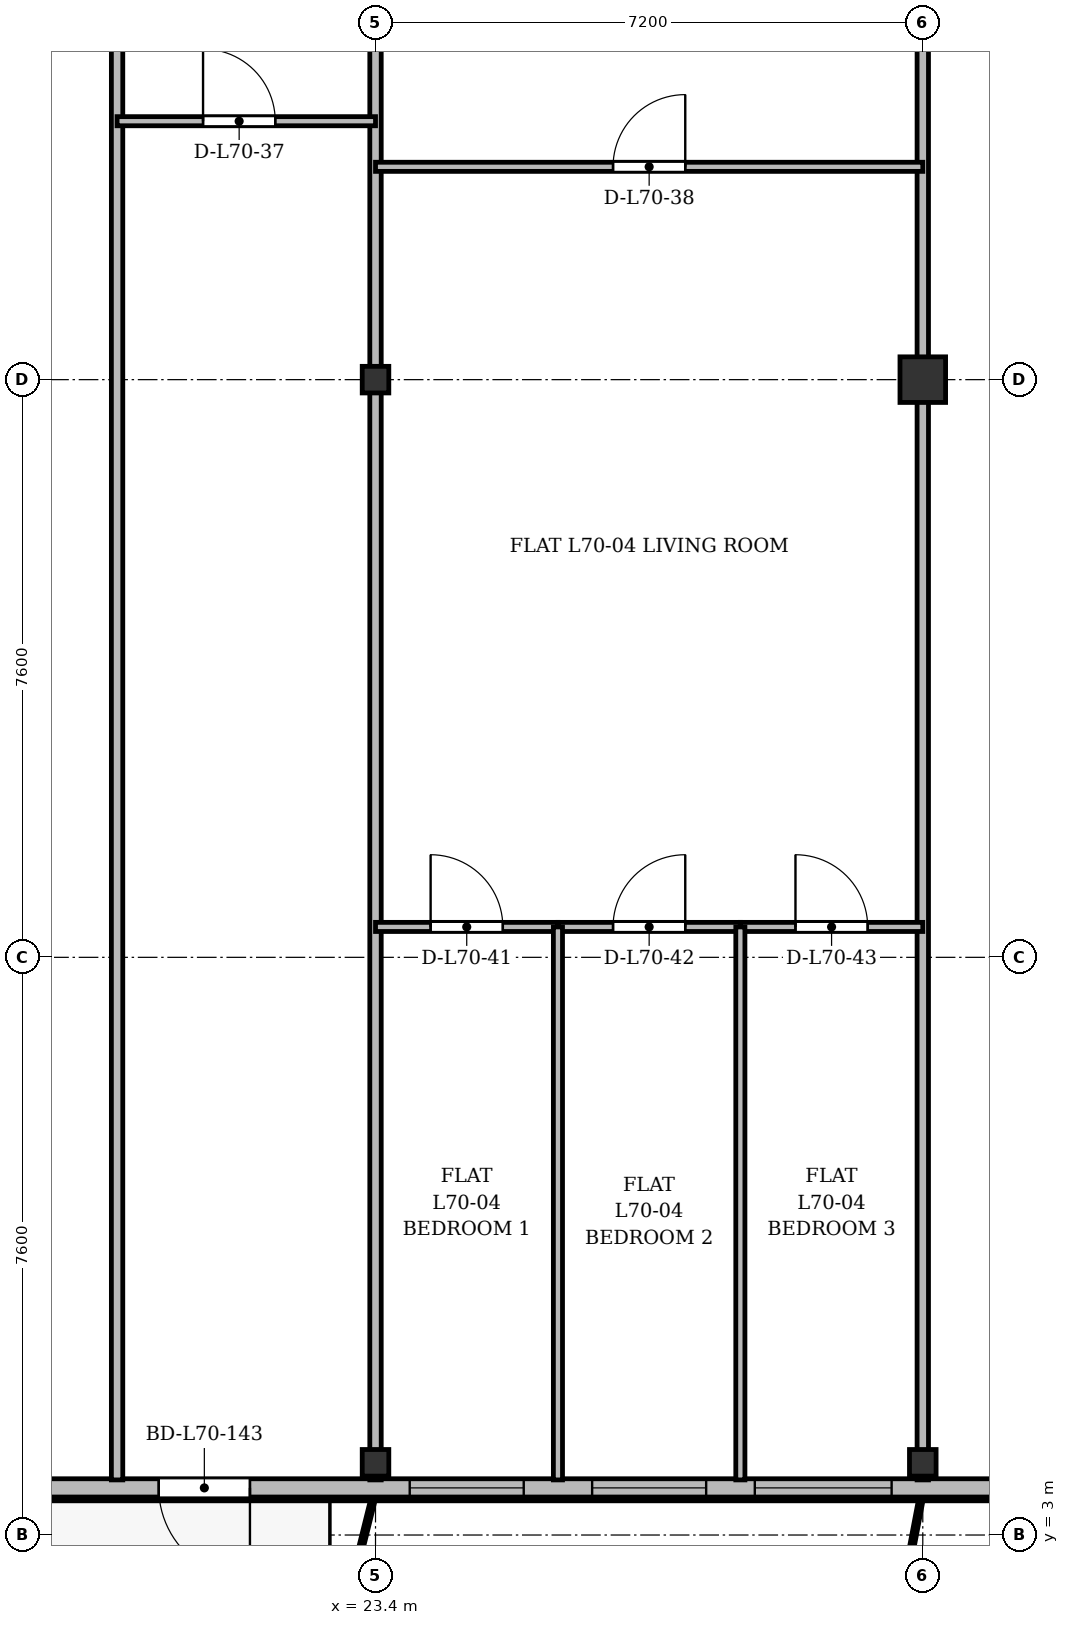
"""IFC4 building model, lengths in metres.
Left out: names, types, materials, properties, quantities, classifications, styles, units other than length and angle.
Written with IfcOpenShell. Run it as: python <this file> out.ifc"""

import sys

from ifc_helpers import new_model, si_unit, direction, frame, frame_2d, origin, origin_2d, place, context, subcontext, project, spatial, rectangle, i_section, extrude, source, transform, mapped, element, fill, save


model = new_model("IFC4")
c1 = context("Model", 3, precision=1e-05, world=origin(), true_north=direction((0.0, 1.0)))
c2 = subcontext(c1, "Body", "Model", "MODEL_VIEW")
j1 = project(units=[si_unit("LENGTHUNIT", "METRE"), si_unit("PLANEANGLEUNIT", "RADIAN")], contexts=[c1])
p1 = place(None, origin())
s1 = spatial("IfcSite", under=j1, at=p1, CompositionType="ELEMENT")
p2 = place(p1, origin())
s2 = spatial("IfcBuilding", under=s1, at=p2, CompositionType="ELEMENT")
p3 = place(p2, frame((0.0, 0.0, 270.3)))
s3 = spatial("IfcBuildingStorey", under=s2, at=p3, CompositionType="ELEMENT", Elevation=270.3)
m1 = source(origin(), c2, "Body", "SweptSolid", [
    extrude(i_section(OverallWidth=0.35, OverallDepth=0.35, WebThickness=0.018, FlangeThickness=0.028, at=origin_2d()), origin(), (0.0, 0.0, 1.0), 3.6),
])
for number, where, z_axis, x_axis in (
    (1, (23.4, 3.95, 0.0), (0.0, 0.0, 1.0), (1.0, 0.0, 0.0)),
    (2, (23.4, 18.2, 0.0), (0.0, 0.0, 1.0), (1.0, 0.0, 0.0)),
    (3, (30.6, 3.95, 0.0), (0.0, 0.0, 1.0), (1.0, 0.0, 0.0)),
):
    element("IfcColumn", number, at=place(p3, frame(where, z_axis=z_axis, x_axis=x_axis)), inside=s3, PredefinedType="COLUMN", context=c2, shape_type="MappedRepresentation", body=[
        mapped(m1, transform((0.0, 0.0, 0.0), x_axis=(1.0, 0.0, 0.0), y_axis=(0.0, 1.0, 0.0), z_axis=(0.0, 0.0, 1.0), scale=1.0)),
    ])
m2 = source(origin(), c2, "Body", "SweptSolid", [
    extrude(rectangle(XDim=0.6, YDim=0.6, at=origin_2d()), origin(), (0.0, 0.0, 1.0), 3.6),
])
p4 = place(p3, frame((30.6, 18.2, 0.0), z_axis=(0.0, 0.0, 1.0), x_axis=(1.0, 0.0, 0.0)))
e4 = element("IfcColumn", 4, at=p4, inside=s3, PredefinedType="COLUMN", context=c2, shape_type="MappedRepresentation", body=[
    mapped(m2, transform((0.0, 0.0, 0.0), x_axis=(1.0, 0.0, 0.0), y_axis=(0.0, 1.0, 0.0), z_axis=(0.0, 0.0, 1.0), scale=1.0)),
])
p5 = place(p3, frame((63.2, 3.62, 0.0), z_axis=(0.0, 0.0, 1.0), x_axis=(-1.0, 0.0, 0.0)))
e5 = element("IfcWall", 5, at=p5, inside=s3, PredefinedType="SOLIDWALL", context=c2, shape_type="SweptSolid", body=[
    extrude(rectangle(XDim=52.0, YDim=0.24, at=frame_2d((26.0, 0.0))), origin(), (0.0, 0.0, 1.0), 3.37),
])
p6 = place(p5, frame((1.345, 0.0, 0.9)))
e6 = element("IfcOpeningElement", 6, at=p6, cuts=e5, PredefinedType="OPENING", context=c2, shape_type="SweptSolid", body=[
    extrude(rectangle(XDim=1.8, YDim=1.8, at=frame_2d((0.9, 0.9))), frame((0.0, 0.13, 0.0), z_axis=(0.0, -1.0, 0.0), x_axis=(1.0, 0.0, 0.0)), (0.0, 0.0, 1.0), 0.26),
])
p7 = place(p5, frame((5.1, 0.0, 0.9)))
e7 = element("IfcOpeningElement", 7, at=p7, cuts=e5, PredefinedType="OPENING", context=c2, shape_type="SweptSolid", body=[
    extrude(rectangle(XDim=2.2, YDim=1.8, at=frame_2d((1.1, 0.9))), frame((0.0, 0.13, 0.0), z_axis=(0.0, -1.0, 0.0), x_axis=(1.0, 0.0, 0.0)), (0.0, 0.0, 1.0), 0.26),
])
p8 = place(p5, frame((9.35, 0.0, 0.9)))
e8 = element("IfcOpeningElement", 8, at=p8, cuts=e5, PredefinedType="OPENING", context=c2, shape_type="SweptSolid", body=[
    extrude(rectangle(XDim=1.5, YDim=1.75, at=frame_2d((0.75, 0.875))), frame((0.0, 0.13, 0.0), z_axis=(0.0, -1.0, 0.0), x_axis=(1.0, 0.0, 0.0)), (0.0, 0.0, 1.0), 0.26),
])
p9 = place(p5, frame((14.017, 0.0, 0.0)))
e9 = element("IfcOpeningElement", 9, at=p9, cuts=e5, PredefinedType="OPENING", context=c2, shape_type="SweptSolid", body=[
    extrude(rectangle(XDim=1.2, YDim=2.2, at=frame_2d((0.6, 1.1))), frame((0.0, 0.13, 0.0), z_axis=(0.0, -1.0, 0.0), x_axis=(1.0, 0.0, 0.0)), (0.0, 0.0, 1.0), 0.26),
])
p10 = place(p5, frame((25.175, 0.0, 0.9)))
e10 = element("IfcOpeningElement", 10, at=p10, cuts=e5, PredefinedType="OPENING", context=c2, shape_type="SweptSolid", body=[
    extrude(rectangle(XDim=1.65, YDim=1.85, at=frame_2d((0.825, 0.925))), frame((0.0, 0.13, 0.0), z_axis=(0.0, -1.0, 0.0), x_axis=(1.0, 0.0, 0.0)), (0.0, 0.0, 1.0), 0.26),
])
p11 = place(p5, frame((33.01, 0.0, 0.9)))
e11 = element("IfcOpeningElement", 11, at=p11, cuts=e5, PredefinedType="OPENING", context=c2, shape_type="SweptSolid", body=[
    extrude(rectangle(XDim=1.8, YDim=1.8, at=frame_2d((0.9, 0.9))), frame((0.0, 0.13, 0.0), z_axis=(0.0, -1.0, 0.0), x_axis=(1.0, 0.0, 0.0)), (0.0, 0.0, 1.0), 0.26),
])
p12 = place(p5, frame((35.45, 0.0, 0.9)))
e12 = element("IfcOpeningElement", 12, at=p12, cuts=e5, PredefinedType="OPENING", context=c2, shape_type="SweptSolid", body=[
    extrude(rectangle(XDim=1.5, YDim=1.75, at=frame_2d((0.75, 0.875))), frame((0.0, 0.13, 0.0), z_axis=(0.0, -1.0, 0.0), x_axis=(1.0, 0.0, 0.0)), (0.0, 0.0, 1.0), 0.26),
])
p13 = place(p5, frame((37.85, 0.0, 0.9)))
e13 = element("IfcOpeningElement", 13, at=p13, cuts=e5, PredefinedType="OPENING", context=c2, shape_type="SweptSolid", body=[
    extrude(rectangle(XDim=1.5, YDim=1.75, at=frame_2d((0.75, 0.875))), frame((0.0, 0.13, 0.0), z_axis=(0.0, -1.0, 0.0), x_axis=(1.0, 0.0, 0.0)), (0.0, 0.0, 1.0), 0.26),
])
p14 = place(p5, frame((41.452, 0.0, 0.0)))
e14 = element("IfcOpeningElement", 14, at=p14, cuts=e5, PredefinedType="OPENING", context=c2, shape_type="SweptSolid", body=[
    extrude(rectangle(XDim=1.2, YDim=2.2, at=frame_2d((0.6, 1.1))), frame((0.0, 0.13, 0.0), z_axis=(0.0, -1.0, 0.0), x_axis=(1.0, 0.0, 0.0)), (0.0, 0.0, 1.0), 0.26),
])
p15 = place(p5, frame((44.575, 0.0, 0.9)))
e15 = element("IfcOpeningElement", 15, at=p15, cuts=e5, PredefinedType="OPENING", context=c2, shape_type="SweptSolid", body=[
    extrude(rectangle(XDim=1.65, YDim=1.85, at=frame_2d((0.825, 0.925))), frame((0.0, 0.13, 0.0), z_axis=(0.0, -1.0, 0.0), x_axis=(1.0, 0.0, 0.0)), (0.0, 0.0, 1.0), 0.26),
])
p16 = place(p5, frame((48.855, 0.0, 0.9)))
e16 = element("IfcOpeningElement", 16, at=p16, cuts=e5, PredefinedType="OPENING", context=c2, shape_type="SweptSolid", body=[
    extrude(rectangle(XDim=1.8, YDim=1.8, at=frame_2d((0.9, 0.9))), frame((0.0, 0.13, 0.0), z_axis=(0.0, -1.0, 0.0), x_axis=(1.0, 0.0, 0.0)), (0.0, 0.0, 1.0), 0.26),
])
p17 = place(p3, frame((20.0, 3.725, 0.0), z_axis=(0.0, 0.0, 1.0), x_axis=(0.0, 1.0, 0.0)))
e17 = element("IfcWall", 17, at=p17, inside=s3, PredefinedType="PARTITIONING", context=c2, shape_type="SweptSolid", body=[
    extrude(rectangle(XDim=27.275, YDim=0.15, at=frame_2d((13.637, 0.0))), origin(), (0.0, 0.0, 1.0), 2.92),
])
for number, where, z_axis, x_axis in (
    (18, (23.4, 3.725, 0.0), (0.0, 0.0, 1.0), (0.0, 1.0, 0.0)),
    (19, (30.6, 3.725, 0.0), (0.0, 0.0, 1.0), (0.0, 1.0, 0.0)),
):
    element("IfcWall", number, at=place(p3, frame(where, z_axis=z_axis, x_axis=x_axis)), inside=s3, PredefinedType="PARTITIONING", context=c2, shape_type="SweptSolid", body=[
        extrude(rectangle(XDim=27.275, YDim=0.15, at=frame_2d((13.637, 0.0))), origin(), (0.0, 0.0, 1.0), 2.87),
    ])
p18 = place(p3, frame((20.0, 21.6, 0.0), z_axis=(0.0, 0.0, 1.0), x_axis=(1.0, 0.0, 0.0)))
e20 = element("IfcWall", 20, at=p18, inside=s3, PredefinedType="PARTITIONING", context=c2, shape_type="SweptSolid", body=[
    extrude(rectangle(XDim=3.4, YDim=0.12, at=frame_2d((1.7, 0.0))), origin(), (0.0, 0.0, 1.0), 2.87),
])
p19 = place(p18, frame((1.131, 0.0, 0.0)))
e21 = element("IfcOpeningElement", 21, at=p19, cuts=e20, PredefinedType="OPENING", context=c2, shape_type="SweptSolid", body=[
    extrude(rectangle(XDim=0.95, YDim=2.15, at=frame_2d((0.475, 1.075))), frame((0.0, 0.07, 0.0), z_axis=(0.0, -1.0, 0.0), x_axis=(1.0, 0.0, 0.0)), (0.0, 0.0, 1.0), 0.14),
])
p20 = place(p3, frame((23.4, 21.0, 0.0), z_axis=(0.0, 0.0, 1.0), x_axis=(1.0, 0.0, 0.0)))
e22 = element("IfcWall", 22, at=p20, inside=s3, PredefinedType="PARTITIONING", context=c2, shape_type="SweptSolid", body=[
    extrude(rectangle(XDim=7.2, YDim=0.12, at=frame_2d((3.6, 0.0))), origin(), (0.0, 0.0, 1.0), 2.87),
])
p21 = place(p20, frame((3.125, 0.0, 0.0)))
e23 = element("IfcOpeningElement", 23, at=p21, cuts=e22, PredefinedType="OPENING", context=c2, shape_type="SweptSolid", body=[
    extrude(rectangle(XDim=0.95, YDim=2.15, at=frame_2d((0.475, 1.075))), frame((0.0, 0.07, 0.0), z_axis=(0.0, -1.0, 0.0), x_axis=(1.0, 0.0, 0.0)), (0.0, 0.0, 1.0), 0.14),
])
p22 = place(p3, frame((23.4, 11.0, 0.0), z_axis=(0.0, 0.0, 1.0), x_axis=(1.0, 0.0, 0.0)))
e24 = element("IfcWall", 24, at=p22, inside=s3, PredefinedType="PARTITIONING", context=c2, shape_type="SweptSolid", body=[
    extrude(rectangle(XDim=2.4, YDim=0.12, at=frame_2d((1.2, 0.0))), origin(), (0.0, 0.0, 1.0), 2.87),
])
p23 = place(p22, frame((0.725, 0.0, 0.0)))
e25 = element("IfcOpeningElement", 25, at=p23, cuts=e24, PredefinedType="OPENING", context=c2, shape_type="SweptSolid", body=[
    extrude(rectangle(XDim=0.95, YDim=2.15, at=frame_2d((0.475, 1.075))), frame((0.0, 0.07, 0.0), z_axis=(0.0, -1.0, 0.0), x_axis=(1.0, 0.0, 0.0)), (0.0, 0.0, 1.0), 0.14),
])
p24 = place(p3, frame((25.8, 11.0, 0.0), z_axis=(0.0, 0.0, 1.0), x_axis=(1.0, 0.0, 0.0)))
e26 = element("IfcWall", 26, at=p24, inside=s3, PredefinedType="PARTITIONING", context=c2, shape_type="SweptSolid", body=[
    extrude(rectangle(XDim=2.4, YDim=0.12, at=frame_2d((1.2, 0.0))), origin(), (0.0, 0.0, 1.0), 3.07),
])
p25 = place(p24, frame((0.725, 0.0, 0.0)))
e27 = element("IfcOpeningElement", 27, at=p25, cuts=e26, PredefinedType="OPENING", context=c2, shape_type="SweptSolid", body=[
    extrude(rectangle(XDim=0.95, YDim=2.15, at=frame_2d((0.475, 1.075))), frame((0.0, 0.07, 0.0), z_axis=(0.0, -1.0, 0.0), x_axis=(1.0, 0.0, 0.0)), (0.0, 0.0, 1.0), 0.14),
])
p26 = place(p3, frame((25.8, 3.725, 0.0), z_axis=(0.0, 0.0, 1.0), x_axis=(0.0, 1.0, 0.0)))
e28 = element("IfcWall", 28, at=p26, inside=s3, PredefinedType="PARTITIONING", context=c2, shape_type="SweptSolid", body=[
    extrude(rectangle(XDim=7.275, YDim=0.12, at=frame_2d((3.637, 0.0))), origin(), (0.0, 0.0, 1.0), 2.92),
])
p27 = place(p3, frame((28.2, 11.0, 0.0), z_axis=(0.0, 0.0, 1.0), x_axis=(1.0, 0.0, 0.0)))
e29 = element("IfcWall", 29, at=p27, inside=s3, PredefinedType="PARTITIONING", context=c2, shape_type="SweptSolid", body=[
    extrude(rectangle(XDim=2.4, YDim=0.12, at=frame_2d((1.2, 0.0))), origin(), (0.0, 0.0, 1.0), 2.87),
])
p28 = place(p27, frame((0.725, 0.0, 0.0)))
e30 = element("IfcOpeningElement", 30, at=p28, cuts=e29, PredefinedType="OPENING", context=c2, shape_type="SweptSolid", body=[
    extrude(rectangle(XDim=0.95, YDim=2.15, at=frame_2d((0.475, 1.075))), frame((0.0, 0.07, 0.0), z_axis=(0.0, -1.0, 0.0), x_axis=(1.0, 0.0, 0.0)), (0.0, 0.0, 1.0), 0.14),
])
p29 = place(p3, frame((28.2, 3.725, 0.0), z_axis=(0.0, 0.0, 1.0), x_axis=(0.0, 1.0, 0.0)))
e31 = element("IfcWall", 31, at=p29, inside=s3, PredefinedType="PARTITIONING", context=c2, shape_type="SweptSolid", body=[
    extrude(rectangle(XDim=7.275, YDim=0.12, at=frame_2d((3.637, 0.0))), origin(), (0.0, 0.0, 1.0), 2.92),
])
m3 = source(origin(), c2, "Body", "SweptSolid", [
    extrude(rectangle(XDim=1.8, YDim=1.8, at=frame_2d((0.9, 0.9))), frame((0.0, 0.03, 0.0), z_axis=(0.0, -1.0, 0.0), x_axis=(1.0, 0.0, 0.0)), (0.0, 0.0, 1.0), 0.06),
])
p30 = place(p11, origin())
e32 = element("IfcWindow", 32, at=p30, inside=s3, PartitioningType="SINGLE_PANEL", PredefinedType="WINDOW", context=c2, shape_type="MappedRepresentation", body=[
    mapped(m3, transform((0.0, 0.0, 0.0), x_axis=(1.0, 0.0, 0.0), y_axis=(0.0, 1.0, 0.0), z_axis=(0.0, 0.0, 1.0), scale=1.0)),
])
fill(e11, e32)
m4 = source(origin(), c2, "Body", "SweptSolid", [
    extrude(rectangle(XDim=1.5, YDim=1.75, at=frame_2d((0.75, 0.875))), frame((0.0, 0.03, 0.0), z_axis=(0.0, -1.0, 0.0), x_axis=(1.0, 0.0, 0.0)), (0.0, 0.0, 1.0), 0.06),
])
p31 = place(p12, origin())
e33 = element("IfcWindow", 33, at=p31, inside=s3, PartitioningType="SINGLE_PANEL", PredefinedType="WINDOW", context=c2, shape_type="MappedRepresentation", body=[
    mapped(m4, transform((0.0, 0.0, 0.0), x_axis=(1.0, 0.0, 0.0), y_axis=(0.0, 1.0, 0.0), z_axis=(0.0, 0.0, 1.0), scale=1.0)),
])
fill(e12, e33)
p32 = place(p13, origin())
e34 = element("IfcWindow", 34, at=p32, inside=s3, PartitioningType="SINGLE_PANEL", PredefinedType="WINDOW", context=c2, shape_type="MappedRepresentation", body=[
    mapped(m4, transform((0.0, 0.0, 0.0), x_axis=(1.0, 0.0, 0.0), y_axis=(0.0, 1.0, 0.0), z_axis=(0.0, 0.0, 1.0), scale=1.0)),
])
fill(e13, e34)
m5 = source(origin(), c2, "Body", "SweptSolid", [
    extrude(rectangle(XDim=1.2, YDim=2.2, at=frame_2d((0.6, 1.1))), frame((0.0, 0.025, 0.0), z_axis=(0.0, -1.0, 0.0), x_axis=(1.0, 0.0, 0.0)), (0.0, 0.0, 1.0), 0.05),
])
p33 = place(p14, origin())
e35 = element("IfcDoor", 35, at=p33, inside=s3, OperationType="SINGLE_SWING_LEFT", PredefinedType="DOOR", context=c2, shape_type="MappedRepresentation", body=[
    mapped(m5, transform((0.0, 0.0, 0.0), x_axis=(1.0, 0.0, 0.0), y_axis=(0.0, 1.0, 0.0), z_axis=(0.0, 0.0, 1.0), scale=1.0)),
])
fill(e14, e35)
m6 = source(origin(), c2, "Body", "SweptSolid", [
    extrude(rectangle(XDim=0.95, YDim=2.15, at=frame_2d((0.475, 1.075))), frame((0.0, 0.025, 0.0), z_axis=(0.0, -1.0, 0.0), x_axis=(1.0, 0.0, 0.0)), (0.0, 0.0, 1.0), 0.05),
])
p34 = place(p19, origin())
e36 = element("IfcDoor", 36, at=p34, inside=s3, OperationType="SINGLE_SWING_LEFT", PredefinedType="DOOR", context=c2, shape_type="MappedRepresentation", body=[
    mapped(m6, transform((0.0, 0.0, 0.0), x_axis=(1.0, 0.0, 0.0), y_axis=(0.0, 1.0, 0.0), z_axis=(0.0, 0.0, 1.0), scale=1.0)),
])
fill(e21, e36)
p35 = place(p21, origin())
e37 = element("IfcDoor", 37, at=p35, inside=s3, OperationType="SINGLE_SWING_RIGHT", PredefinedType="DOOR", context=c2, shape_type="MappedRepresentation", body=[
    mapped(m6, transform((0.0, 0.0, 0.0), x_axis=(1.0, 0.0, 0.0), y_axis=(0.0, 1.0, 0.0), z_axis=(0.0, 0.0, 1.0), scale=1.0)),
])
fill(e23, e37)
p36 = place(p23, origin())
e38 = element("IfcDoor", 38, at=p36, inside=s3, OperationType="SINGLE_SWING_LEFT", PredefinedType="DOOR", context=c2, shape_type="MappedRepresentation", body=[
    mapped(m6, transform((0.0, 0.0, 0.0), x_axis=(1.0, 0.0, 0.0), y_axis=(0.0, 1.0, 0.0), z_axis=(0.0, 0.0, 1.0), scale=1.0)),
])
fill(e25, e38)
p37 = place(p25, origin())
e39 = element("IfcDoor", 39, at=p37, inside=s3, OperationType="SINGLE_SWING_RIGHT", PredefinedType="DOOR", context=c2, shape_type="MappedRepresentation", body=[
    mapped(m6, transform((0.0, 0.0, 0.0), x_axis=(1.0, 0.0, 0.0), y_axis=(0.0, 1.0, 0.0), z_axis=(0.0, 0.0, 1.0), scale=1.0)),
])
fill(e27, e39)
p38 = place(p28, origin())
e40 = element("IfcDoor", 40, at=p38, inside=s3, OperationType="SINGLE_SWING_LEFT", PredefinedType="DOOR", context=c2, shape_type="MappedRepresentation", body=[
    mapped(m6, transform((0.0, 0.0, 0.0), x_axis=(1.0, 0.0, 0.0), y_axis=(0.0, 1.0, 0.0), z_axis=(0.0, 0.0, 1.0), scale=1.0)),
])
fill(e30, e40)
save(model, sys.argv[1])
